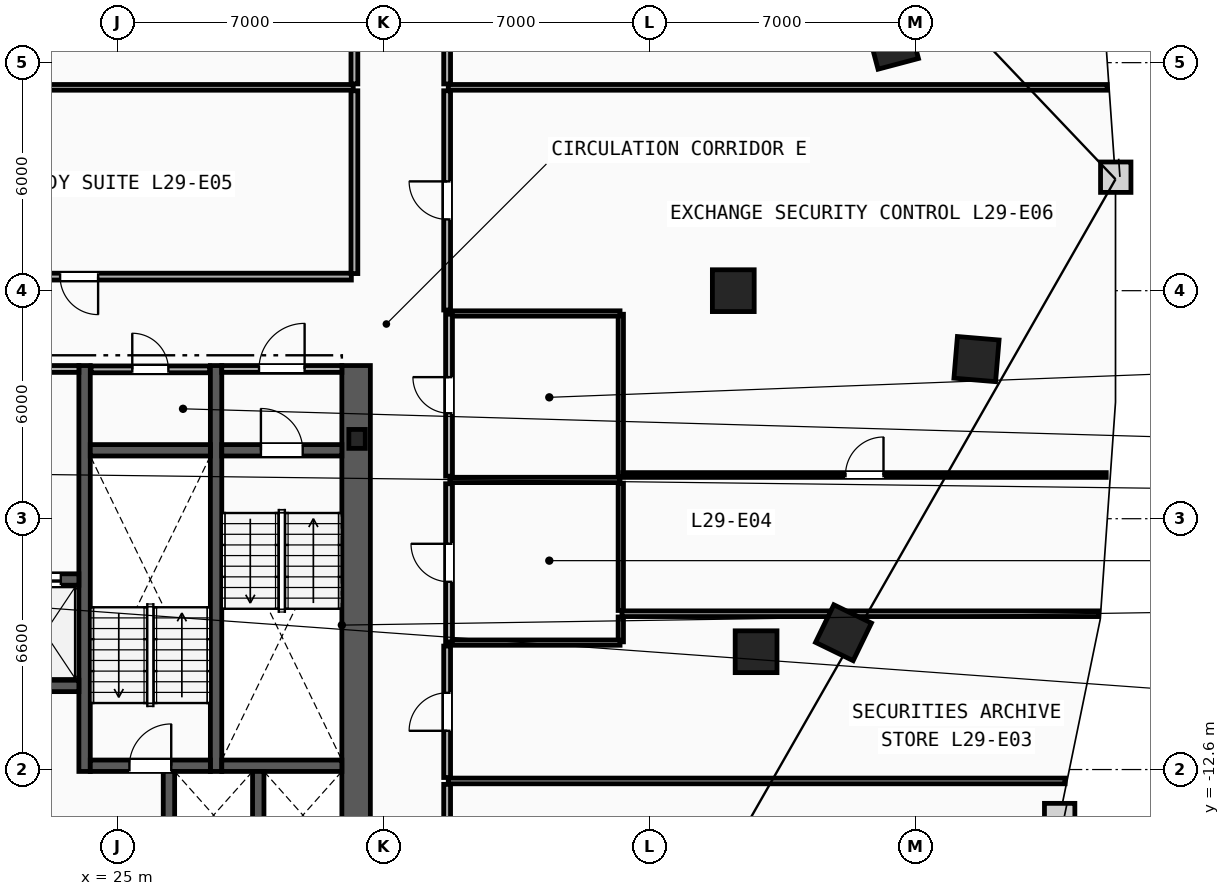
"""IFC4 building model, lengths in metres.
Left out: names, types, materials, properties, quantities, classifications, styles, units other than length and angle.
Written with IfcOpenShell. Run it as: python <this file> out.ifc"""

import sys

from ifc_helpers import new_model, si_unit, direction, frame, frame_2d, origin, origin_2d, place, context, subcontext, project, spatial, rectangle, i_section, extrude, element, fill, save


model = new_model("IFC4")
c1 = context("Model", 3, precision=1e-05, world=origin(), true_north=direction((0.0, 1.0)))
c2 = subcontext(c1, "Body", "Model", "MODEL_VIEW")
j1 = project(units=[si_unit("LENGTHUNIT", "METRE"), si_unit("PLANEANGLEUNIT", "RADIAN")], contexts=[c1])
p1 = place(None, origin())
s1 = spatial("IfcSite", under=j1, at=p1, CompositionType="ELEMENT")
p2 = place(p1, origin())
s2 = spatial("IfcBuilding", under=s1, at=p2, CompositionType="ELEMENT")
p3 = place(p2, frame((0.0, 0.0, 114.2)))
s3 = spatial("IfcBuildingStorey", under=s2, at=p3, CompositionType="ELEMENT", Elevation=114.2)
p4 = place(p3, frame((31.3, -3.9, 0.0), z_axis=(0.0, 0.0, 1.0), x_axis=(1.0, 0.0, 0.0)))
e1 = element("IfcColumn", 1, at=p4, inside=s3, PredefinedType="COLUMN", context=c2, shape_type="SweptSolid", body=[
    extrude(i_section(OverallWidth=0.432, OverallDepth=0.498, WebThickness=0.056, FlangeThickness=0.089, FilletRadius=0.018, at=origin_2d()), origin(), (0.0, 0.0, 1.0), 3.6),
])
for number, where, z_axis, x_axis in (
    (2, (41.2, 0.0, 0.0), (0.0, 0.0, 1.0), (1.0, 0.0, 0.0)),
    (3, (41.8, -9.5, 0.0), (0.0, 0.0, 1.0), (1.0, 0.0, 0.0)),
    (4, (44.1, -9.0, 0.0), (0.0, 0.0, 1.0), (0.437, 0.899, 0.0)),
    (5, (47.6, -1.8, 0.0), (0.0, 0.0, 1.0), (0.084, 0.997, 0.0)),
    (6, (45.4, 6.5, 0.0), (0.0, 0.0, 1.0), (-0.256, 0.967, 0.0)),
):
    element("IfcColumn", number, at=place(p3, frame(where, z_axis=z_axis, x_axis=x_axis)), inside=s3, PredefinedType="COLUMN", context=c2, shape_type="SweptSolid", body=[
        extrude(rectangle(XDim=1.1, YDim=1.1, at=origin_2d()), origin(), (0.0, 0.0, 1.0), 3.6),
    ])
p5 = place(p3, frame((31.275, -15.3, 0.0), z_axis=(0.0, 0.0, 1.0), x_axis=(0.0, 1.0, 0.0)))
e7 = element("IfcWall", 7, at=p5, inside=s3, PredefinedType="SHEAR", context=c2, shape_type="SweptSolid", body=[
    extrude(rectangle(XDim=13.33, YDim=0.75, at=frame_2d((6.665, 0.0))), origin(), (0.0, 0.0, 1.0), 3.3),
])
for number, where, z_axis, x_axis in (
    (8, (27.59, -12.65, 0.0), (0.0, 0.0, 1.0), (0.0, 1.0, 0.0)),
    (9, (24.13, -12.65, 0.0), (0.0, 0.0, 1.0), (0.0, 1.0, 0.0)),
):
    element("IfcWall", number, at=place(p3, frame(where, z_axis=z_axis, x_axis=x_axis)), inside=s3, PredefinedType="SHEAR", context=c2, shape_type="SweptSolid", body=[
        extrude(rectangle(XDim=10.68, YDim=0.3, at=frame_2d((5.34, 0.0))), origin(), (0.0, 0.0, 1.0), 3.3),
    ])
p6 = place(p3, frame((27.74, -4.2, 0.0), z_axis=(0.0, 0.0, 1.0), x_axis=(1.0, 0.0, 0.0)))
e10 = element("IfcWall", 10, at=p6, inside=s3, PredefinedType="SHEAR", context=c2, shape_type="SweptSolid", body=[
    extrude(rectangle(XDim=3.16, YDim=0.3, at=frame_2d((1.58, 0.0))), origin(), (0.0, 0.0, 1.0), 3.3),
])
p7 = place(p6, frame((1.03, 0.0, 0.0)))
e11 = element("IfcOpeningElement", 11, at=p7, cuts=e10, PredefinedType="OPENING", context=c2, shape_type="SweptSolid", body=[
    extrude(rectangle(XDim=1.1, YDim=2.15, at=frame_2d((0.55, 1.075))), frame((0.0, 0.16, 0.0), z_axis=(0.0, -1.0, 0.0), x_axis=(1.0, 0.0, 0.0)), (0.0, 0.0, 1.0), 0.32),
])
p8 = place(p3, frame((27.74, -12.5, 0.0), z_axis=(0.0, 0.0, 1.0), x_axis=(1.0, 0.0, 0.0)))
e12 = element("IfcWall", 12, at=p8, inside=s3, PredefinedType="SHEAR", context=c2, shape_type="SweptSolid", body=[
    extrude(rectangle(XDim=3.16, YDim=0.3, at=frame_2d((1.58, 0.0))), origin(), (0.0, 0.0, 1.0), 3.3),
])
p9 = place(p3, frame((24.28, -12.5, 0.0), z_axis=(0.0, 0.0, 1.0), x_axis=(1.0, 0.0, 0.0)))
e13 = element("IfcWall", 13, at=p9, inside=s3, PredefinedType="SHEAR", context=c2, shape_type="SweptSolid", body=[
    extrude(rectangle(XDim=3.16, YDim=0.3, at=frame_2d((1.58, 0.0))), origin(), (0.0, 0.0, 1.0), 3.3),
])
p10 = place(p9, frame((1.03, 0.0, 0.0)))
e14 = element("IfcOpeningElement", 14, at=p10, cuts=e13, PredefinedType="OPENING", context=c2, shape_type="SweptSolid", body=[
    extrude(rectangle(XDim=1.1, YDim=2.15, at=frame_2d((0.55, 1.075))), frame((0.0, 0.16, 0.0), z_axis=(0.0, -1.0, 0.0), x_axis=(1.0, 0.0, 0.0)), (0.0, 0.0, 1.0), 0.32),
])
p11 = place(p3, frame((24.28, -4.2, 0.0), z_axis=(0.0, 0.0, 1.0), x_axis=(1.0, 0.0, 0.0)))
e15 = element("IfcWall", 15, at=p11, inside=s3, PredefinedType="SHEAR", context=c2, shape_type="SweptSolid", body=[
    extrude(rectangle(XDim=3.16, YDim=0.3, at=frame_2d((1.58, 0.0))), origin(), (0.0, 0.0, 1.0), 3.3),
])
p12 = place(p3, frame((20.98, -2.06, 0.0), z_axis=(0.0, 0.0, 1.0), x_axis=(1.0, 0.0, 0.0)))
e16 = element("IfcWall", 16, at=p12, inside=s3, PredefinedType="PARTITIONING", context=c2, shape_type="SweptSolid", body=[
    extrude(rectangle(XDim=3.0, YDim=0.18, at=frame_2d((1.5, 0.0))), origin(), (0.0, 0.0, 1.0), 3.3),
])
p13 = place(p12, frame((0.9, 0.0, 0.0)))
e17 = element("IfcOpeningElement", 17, at=p13, cuts=e16, PredefinedType="OPENING", context=c2, shape_type="SweptSolid", body=[
    extrude(rectangle(XDim=1.2, YDim=2.15, at=frame_2d((0.6, 1.075))), frame((0.0, 0.1, 0.0), z_axis=(0.0, -1.0, 0.0), x_axis=(1.0, 0.0, 0.0)), (0.0, 0.0, 1.0), 0.2),
])
p14 = place(p3, frame((27.74, -2.06, 0.0), z_axis=(0.0, 0.0, 1.0), x_axis=(1.0, 0.0, 0.0)))
e18 = element("IfcWall", 18, at=p14, inside=s3, PredefinedType="PARTITIONING", context=c2, shape_type="SweptSolid", body=[
    extrude(rectangle(XDim=3.16, YDim=0.18, at=frame_2d((1.58, 0.0))), origin(), (0.0, 0.0, 1.0), 3.3),
])
p15 = place(p14, frame((0.98, 0.0, 0.0)))
e19 = element("IfcOpeningElement", 19, at=p15, cuts=e18, PredefinedType="OPENING", context=c2, shape_type="SweptSolid", body=[
    extrude(rectangle(XDim=1.2, YDim=2.15, at=frame_2d((0.6, 1.075))), frame((0.0, 0.1, 0.0), z_axis=(0.0, -1.0, 0.0), x_axis=(1.0, 0.0, 0.0)), (0.0, 0.0, 1.0), 0.2),
])
p16 = place(p3, frame((21.88, -7.6, 0.0), z_axis=(0.0, 0.0, 1.0), x_axis=(1.0, 0.0, 0.0)))
e20 = element("IfcWall", 20, at=p16, inside=s3, PredefinedType="SHEAR", context=c2, shape_type="SweptSolid", body=[
    extrude(rectangle(XDim=2.1, YDim=0.3, at=frame_2d((1.05, 0.0))), origin(), (0.0, 0.0, 1.0), 3.3),
])
p17 = place(p16, frame((0.475, 0.0, 0.0)))
e21 = element("IfcOpeningElement", 21, at=p17, cuts=e20, PredefinedType="OPENING", context=c2, shape_type="SweptSolid", body=[
    extrude(rectangle(XDim=1.15, YDim=2.2, at=frame_2d((0.575, 1.1))), frame((0.0, 0.16, 0.0), z_axis=(0.0, -1.0, 0.0), x_axis=(1.0, 0.0, 0.0)), (0.0, 0.0, 1.0), 0.32),
])
p18 = place(p3, frame((21.88, -10.4, 0.0), z_axis=(0.0, 0.0, 1.0), x_axis=(1.0, 0.0, 0.0)))
e22 = element("IfcWall", 22, at=p18, inside=s3, PredefinedType="SHEAR", context=c2, shape_type="SweptSolid", body=[
    extrude(rectangle(XDim=2.1, YDim=0.3, at=frame_2d((1.05, 0.0))), origin(), (0.0, 0.0, 1.0), 3.3),
])
for number, where, z_axis, x_axis in (
    (23, (28.7, -14.95, 0.0), (0.0, 0.0, 1.0), (0.0, 1.0, 0.0)),
    (24, (26.35, -14.95, 0.0), (0.0, 0.0, 1.0), (0.0, 1.0, 0.0)),
):
    element("IfcWall", number, at=place(p3, frame(where, z_axis=z_axis, x_axis=x_axis)), inside=s3, PredefinedType="SHEAR", context=c2, shape_type="SweptSolid", body=[
        extrude(rectangle(XDim=2.3, YDim=0.3, at=frame_2d((1.15, 0.0))), origin(), (0.0, 0.0, 1.0), 3.3),
    ])
p19 = place(p3, frame((24.3, -2.07, 0.0), z_axis=(0.0, 0.0, 1.0), x_axis=(1.0, 0.0, 0.0)))
e25 = element("IfcWall", 25, at=p19, inside=s3, PredefinedType="PARTITIONING", context=c2, shape_type="SweptSolid", body=[
    extrude(rectangle(XDim=3.12, YDim=0.18, at=frame_2d((1.56, 0.0))), origin(), (0.0, 0.0, 1.0), 3.3),
])
p20 = place(p19, frame((1.085, 0.0, 0.0)))
e26 = element("IfcOpeningElement", 26, at=p20, cuts=e25, PredefinedType="OPENING", context=c2, shape_type="SweptSolid", body=[
    extrude(rectangle(XDim=0.95, YDim=2.1, at=frame_2d((0.475, 1.05))), frame((0.0, 0.1, 0.0), z_axis=(0.0, -1.0, 0.0), x_axis=(1.0, 0.0, 0.0)), (0.0, 0.0, 1.0), 0.2),
])
p21 = place(p3, frame((38.24, -9.24, 0.0), z_axis=(0.0, 0.0, 1.0), x_axis=(0.0, 1.0, 0.0)))
e27 = element("IfcWall", 27, at=p21, inside=s3, PredefinedType="PARTITIONING", context=c2, shape_type="SweptSolid", body=[
    extrude(rectangle(XDim=0.655, YDim=0.14, at=frame_2d((0.328, 0.0))), origin(), (0.0, 0.0, 1.0), 3.3),
])
p22 = place(p3, frame((38.24, -8.415, 0.0), z_axis=(0.0, 0.0, 1.0), x_axis=(0.0, 1.0, 0.0)))
e28 = element("IfcWall", 28, at=p22, inside=s3, PredefinedType="PARTITIONING", context=c2, shape_type="SweptSolid", body=[
    extrude(rectangle(XDim=3.35, YDim=0.14, at=frame_2d((1.675, 0.0))), origin(), (0.0, 0.0, 1.0), 3.3),
])
p23 = place(p3, frame((38.24, -4.895, 0.0), z_axis=(0.0, 0.0, 1.0), x_axis=(0.0, 1.0, 0.0)))
e29 = element("IfcWall", 29, at=p23, inside=s3, PredefinedType="PARTITIONING", context=c2, shape_type="SweptSolid", body=[
    extrude(rectangle(XDim=4.275, YDim=0.14, at=frame_2d((2.137, 0.0))), origin(), (0.0, 0.0, 1.0), 3.3),
])
for number, where, z_axis, x_axis in (
    (30, (33.74, -0.6, 0.0), (0.0, 0.0, 1.0), (1.0, 0.0, 0.0)),
    (31, (33.74, -4.98, 0.0), (0.0, 0.0, 1.0), (1.0, 0.0, 0.0)),
    (32, (33.74, -9.26, 0.0), (0.0, 0.0, 1.0), (1.0, 0.0, 0.0)),
):
    element("IfcWall", number, at=place(p3, frame(where, z_axis=z_axis, x_axis=x_axis)), inside=s3, PredefinedType="PARTITIONING", context=c2, shape_type="SweptSolid", body=[
        extrude(rectangle(XDim=4.48, YDim=0.14, at=frame_2d((2.24, 0.0))), origin(), (0.0, 0.0, 1.0), 3.3),
    ])
p24 = place(p3, frame((33.72, -4.88, 0.0), z_axis=(0.0, 0.0, 1.0), x_axis=(0.0, 1.0, 0.0)))
e33 = element("IfcWall", 33, at=p24, inside=s3, PredefinedType="PARTITIONING", context=c2, shape_type="SweptSolid", body=[
    extrude(rectangle(XDim=4.26, YDim=0.18, at=frame_2d((2.13, 0.0))), origin(), (0.0, 0.0, 1.0), 3.3),
])
p25 = place(p24, frame((1.655, 0.0, 0.0)))
e34 = element("IfcOpeningElement", 34, at=p25, cuts=e33, PredefinedType="OPENING", context=c2, shape_type="SweptSolid", body=[
    extrude(rectangle(XDim=0.95, YDim=2.1, at=frame_2d((0.475, 1.05))), frame((0.0, 0.1, 0.0), z_axis=(0.0, -1.0, 0.0), x_axis=(1.0, 0.0, 0.0)), (0.0, 0.0, 1.0), 0.2),
])
p26 = place(p3, frame((33.72, -9.24, 0.0), z_axis=(0.0, 0.0, 1.0), x_axis=(0.0, 1.0, 0.0)))
e35 = element("IfcWall", 35, at=p26, inside=s3, PredefinedType="PARTITIONING", context=c2, shape_type="SweptSolid", body=[
    extrude(rectangle(XDim=4.16, YDim=0.18, at=frame_2d((2.08, 0.0))), origin(), (0.0, 0.0, 1.0), 3.3),
])
p27 = place(p26, frame((1.58, 0.0, 0.0)))
e36 = element("IfcOpeningElement", 36, at=p27, cuts=e35, PredefinedType="OPENING", context=c2, shape_type="SweptSolid", body=[
    extrude(rectangle(XDim=1.0, YDim=2.15, at=frame_2d((0.5, 1.075))), frame((0.0, 0.1, 0.0), z_axis=(0.0, -1.0, 0.0), x_axis=(1.0, 0.0, 0.0)), (0.0, 0.0, 1.0), 0.2),
])
p28 = place(p3, frame((12.962, 5.35, 0.0), z_axis=(0.0, 0.0, 1.0), x_axis=(1.0, 0.0, 0.0)))
e37 = element("IfcWall", 37, at=p28, inside=s3, PredefinedType="PARTITIONING", context=c2, shape_type="SweptSolid", body=[
    extrude(rectangle(XDim=18.238, YDim=0.15, at=frame_2d((9.119, 0.0))), origin(), (0.0, 0.0, 1.0), 3.3),
])
p29 = place(p3, frame((33.7, 5.35, 0.0), z_axis=(0.0, 0.0, 1.0), x_axis=(1.0, 0.0, 0.0)))
e38 = element("IfcWall", 38, at=p29, inside=s3, PredefinedType="PARTITIONING", context=c2, shape_type="SweptSolid", body=[
    extrude(rectangle(XDim=17.338, YDim=0.15, at=frame_2d((8.669, 0.0))), origin(), (0.0, 0.0, 1.0), 3.3),
])
p30 = place(p3, frame((38.27, -8.5, 0.0), z_axis=(0.0, 0.0, 1.0), x_axis=(1.0, 0.0, 0.0)))
e39 = element("IfcWall", 39, at=p30, inside=s3, PredefinedType="PARTITIONING", context=c2, shape_type="SweptSolid", body=[
    extrude(rectangle(XDim=12.546, YDim=0.15, at=frame_2d((6.273, 0.0))), origin(), (0.0, 0.0, 1.0), 3.3),
])
p31 = place(p3, frame((33.7, -12.9, 0.0), z_axis=(0.0, 0.0, 1.0), x_axis=(1.0, 0.0, 0.0)))
e40 = element("IfcWall", 40, at=p31, inside=s3, PredefinedType="PARTITIONING", context=c2, shape_type="SweptSolid", body=[
    extrude(rectangle(XDim=16.231, YDim=0.15, at=frame_2d((8.115, 0.0))), origin(), (0.0, 0.0, 1.0), 3.3),
])
p32 = place(p3, frame((33.67, -17.428, 0.0), z_axis=(0.0, 0.0, 1.0), x_axis=(0.0, 1.0, 0.0)))
e41 = element("IfcWall", 41, at=p32, inside=s3, PredefinedType="PARTITIONING", context=c2, shape_type="SweptSolid", body=[
    extrude(rectangle(XDim=4.438, YDim=0.18, at=frame_2d((2.219, 0.0))), origin(), (0.0, 0.0, 1.0), 3.3),
])
p33 = place(p32, frame((1.719, 0.0, 0.0)))
e42 = element("IfcOpeningElement", 42, at=p33, cuts=e41, PredefinedType="OPENING", context=c2, shape_type="SweptSolid", body=[
    extrude(rectangle(XDim=1.0, YDim=2.15, at=frame_2d((0.5, 1.075))), frame((0.0, 0.1, 0.0), z_axis=(0.0, -1.0, 0.0), x_axis=(1.0, 0.0, 0.0)), (0.0, 0.0, 1.0), 0.2),
])
p34 = place(p3, frame((33.67, -12.81, 0.0), z_axis=(0.0, 0.0, 1.0), x_axis=(0.0, 1.0, 0.0)))
e43 = element("IfcWall", 43, at=p34, inside=s3, PredefinedType="PARTITIONING", context=c2, shape_type="SweptSolid", body=[
    extrude(rectangle(XDim=3.459, YDim=0.18, at=frame_2d((1.729, 0.0))), origin(), (0.0, 0.0, 1.0), 3.3),
])
p35 = place(p34, frame((1.229, 0.0, 0.0)))
e44 = element("IfcOpeningElement", 44, at=p35, cuts=e43, PredefinedType="OPENING", context=c2, shape_type="SweptSolid", body=[
    extrude(rectangle(XDim=1.0, YDim=2.15, at=frame_2d((0.5, 1.075))), frame((0.0, 0.1, 0.0), z_axis=(0.0, -1.0, 0.0), x_axis=(1.0, 0.0, 0.0)), (0.0, 0.0, 1.0), 0.2),
])
p36 = place(p3, frame((31.15, 0.37, 0.0), z_axis=(0.0, 0.0, 1.0), x_axis=(-1.0, 0.0, 0.0)))
e45 = element("IfcWall", 45, at=p36, inside=s3, PredefinedType="PARTITIONING", context=c2, shape_type="SweptSolid", body=[
    extrude(rectangle(XDim=14.328, YDim=0.18, at=frame_2d((7.164, 0.0))), origin(), (0.0, 0.0, 1.0), 3.3),
])
p37 = place(p36, frame((6.664, 0.0, 0.0)))
e46 = element("IfcOpeningElement", 46, at=p37, cuts=e45, PredefinedType="OPENING", context=c2, shape_type="SweptSolid", body=[
    extrude(rectangle(XDim=1.0, YDim=2.15, at=frame_2d((0.5, 1.075))), frame((0.0, 0.1, 0.0), z_axis=(0.0, -1.0, 0.0), x_axis=(1.0, 0.0, 0.0)), (0.0, 0.0, 1.0), 0.2),
])
p38 = place(p3, frame((31.23, 5.26, 0.0), z_axis=(0.0, 0.0, 1.0), x_axis=(0.0, -1.0, 0.0)))
e47 = element("IfcWall", 47, at=p38, inside=s3, PredefinedType="PARTITIONING", context=c2, shape_type="SweptSolid", body=[
    extrude(rectangle(XDim=4.81, YDim=0.18, at=frame_2d((2.405, 0.0))), origin(), (0.0, 0.0, 1.0), 3.3),
])
p39 = place(p3, frame((33.67, -0.509, 0.0), z_axis=(0.0, 0.0, 1.0), x_axis=(0.0, 1.0, 0.0)))
e48 = element("IfcWall", 48, at=p39, inside=s3, PredefinedType="PARTITIONING", context=c2, shape_type="SweptSolid", body=[
    extrude(rectangle(XDim=5.769, YDim=0.18, at=frame_2d((2.884, 0.0))), origin(), (0.0, 0.0, 1.0), 3.3),
])
p40 = place(p39, frame((2.384, 0.0, 0.0)))
e49 = element("IfcOpeningElement", 49, at=p40, cuts=e48, PredefinedType="OPENING", context=c2, shape_type="SweptSolid", body=[
    extrude(rectangle(XDim=1.0, YDim=2.15, at=frame_2d((0.5, 1.075))), frame((0.0, 0.1, 0.0), z_axis=(0.0, -1.0, 0.0), x_axis=(1.0, 0.0, 0.0)), (0.0, 0.0, 1.0), 0.2),
])
for number, where, z_axis, x_axis in (
    (50, (33.67, 5.44, 0.0), (0.0, 0.0, 1.0), (0.0, 1.0, 0.0)),
    (51, (31.23, 11.4, 0.0), (0.0, 0.0, 1.0), (0.0, -1.0, 0.0)),
):
    element("IfcWall", number, at=place(p3, frame(where, z_axis=z_axis, x_axis=x_axis)), inside=s3, PredefinedType="PARTITIONING", context=c2, shape_type="SweptSolid", body=[
        extrude(rectangle(XDim=5.96, YDim=0.18, at=frame_2d((2.98, 0.0))), origin(), (0.0, 0.0, 1.0), 3.3),
    ])
p41 = place(p3, frame((38.292, -4.85, 0.0), z_axis=(0.0, 0.0, 1.0), x_axis=(1.0, 0.0, 0.0)))
e52 = element("IfcWall", 52, at=p41, inside=s3, PredefinedType="PARTITIONING", context=c2, shape_type="SweptSolid", body=[
    extrude(rectangle(XDim=12.723, YDim=0.125, at=frame_2d((6.361, 0.0))), origin(), (0.0, 0.0, 1.0), 3.3),
])
p42 = place(p41, frame((5.861, 0.0, 0.0)))
e53 = element("IfcOpeningElement", 53, at=p42, cuts=e52, PredefinedType="OPENING", context=c2, shape_type="SweptSolid", body=[
    extrude(rectangle(XDim=1.0, YDim=2.15, at=frame_2d((0.5, 1.075))), frame((0.0, 0.073, 0.0), z_axis=(0.0, -1.0, 0.0), x_axis=(1.0, 0.0, 0.0)), (0.0, 0.0, 1.0), 0.145),
])
p43 = place(p7, origin())
e54 = element("IfcDoor", 54, at=p43, inside=s3, OperationType="SINGLE_SWING_LEFT", PredefinedType="DOOR", context=c2, shape_type="SweptSolid", body=[
    extrude(rectangle(XDim=1.1, YDim=2.15, at=frame_2d((0.55, 1.075))), frame((0.0, 0.025, 0.0), z_axis=(0.0, -1.0, 0.0), x_axis=(1.0, 0.0, 0.0)), (0.0, 0.0, 1.0), 0.05),
])
fill(e11, e54)
p44 = place(p10, origin())
e55 = element("IfcDoor", 55, at=p44, inside=s3, OperationType="SINGLE_SWING_RIGHT", PredefinedType="DOOR", context=c2, shape_type="SweptSolid", body=[
    extrude(rectangle(XDim=1.1, YDim=2.15, at=frame_2d((0.55, 1.075))), frame((0.0, 0.025, 0.0), z_axis=(0.0, -1.0, 0.0), x_axis=(1.0, 0.0, 0.0)), (0.0, 0.0, 1.0), 0.05),
])
fill(e14, e55)
p45 = place(p15, origin())
e56 = element("IfcDoor", 56, at=p45, inside=s3, OperationType="SINGLE_SWING_RIGHT", PredefinedType="DOOR", context=c2, shape_type="SweptSolid", body=[
    extrude(rectangle(XDim=1.2, YDim=2.15, at=frame_2d((0.6, 1.075))), frame((0.0, 0.025, 0.0), z_axis=(0.0, -1.0, 0.0), x_axis=(1.0, 0.0, 0.0)), (0.0, 0.0, 1.0), 0.05),
])
fill(e19, e56)
p46 = place(p17, origin())
e57 = element("IfcDoor", 57, at=p46, inside=s3, OperationType="SLIDING_TO_LEFT", PredefinedType="TRAPDOOR", context=c2, shape_type="SweptSolid", body=[
    extrude(rectangle(XDim=1.15, YDim=2.2, at=frame_2d((0.575, 1.1))), frame((0.0, 0.025, 0.0), z_axis=(0.0, -1.0, 0.0), x_axis=(1.0, 0.0, 0.0)), (0.0, 0.0, 1.0), 0.05),
])
fill(e21, e57)
p47 = place(p37, origin())
e58 = element("IfcDoor", 58, at=p47, inside=s3, OperationType="SINGLE_SWING_LEFT", PredefinedType="DOOR", context=c2, shape_type="SweptSolid", body=[
    extrude(rectangle(XDim=1.0, YDim=2.15, at=frame_2d((0.5, 1.075))), frame((0.0, 0.025, 0.0), z_axis=(0.0, -1.0, 0.0), x_axis=(1.0, 0.0, 0.0)), (0.0, 0.0, 1.0), 0.05),
])
fill(e46, e58)
p48 = place(p42, origin())
e59 = element("IfcDoor", 59, at=p48, inside=s3, OperationType="SINGLE_SWING_RIGHT", PredefinedType="DOOR", context=c2, shape_type="SweptSolid", body=[
    extrude(rectangle(XDim=1.0, YDim=2.15, at=frame_2d((0.5, 1.075))), frame((0.0, 0.025, 0.0), z_axis=(0.0, -1.0, 0.0), x_axis=(1.0, 0.0, 0.0)), (0.0, 0.0, 1.0), 0.05),
])
fill(e53, e59)
p49 = place(p40, origin())
e60 = element("IfcDoor", 60, at=p49, inside=s3, OperationType="SINGLE_SWING_RIGHT", PredefinedType="DOOR", context=c2, shape_type="SweptSolid", body=[
    extrude(rectangle(XDim=1.0, YDim=2.15, at=frame_2d((0.5, 1.075))), frame((0.0, 0.025, 0.0), z_axis=(0.0, -1.0, 0.0), x_axis=(1.0, 0.0, 0.0)), (0.0, 0.0, 1.0), 0.05),
])
fill(e49, e60)
p50 = place(p25, origin())
e61 = element("IfcDoor", 61, at=p50, inside=s3, OperationType="SINGLE_SWING_RIGHT", PredefinedType="DOOR", context=c2, shape_type="SweptSolid", body=[
    extrude(rectangle(XDim=0.95, YDim=2.1, at=frame_2d((0.475, 1.05))), frame((0.0, 0.025, 0.0), z_axis=(0.0, -1.0, 0.0), x_axis=(1.0, 0.0, 0.0)), (0.0, 0.0, 1.0), 0.05),
])
fill(e34, e61)
p51 = place(p27, origin())
e62 = element("IfcDoor", 62, at=p51, inside=s3, OperationType="SINGLE_SWING_RIGHT", PredefinedType="DOOR", context=c2, shape_type="SweptSolid", body=[
    extrude(rectangle(XDim=1.0, YDim=2.15, at=frame_2d((0.5, 1.075))), frame((0.0, 0.025, 0.0), z_axis=(0.0, -1.0, 0.0), x_axis=(1.0, 0.0, 0.0)), (0.0, 0.0, 1.0), 0.05),
])
fill(e36, e62)
p52 = place(p35, origin())
e63 = element("IfcDoor", 63, at=p52, inside=s3, OperationType="SINGLE_SWING_LEFT", PredefinedType="DOOR", context=c2, shape_type="SweptSolid", body=[
    extrude(rectangle(XDim=1.0, YDim=2.15, at=frame_2d((0.5, 1.075))), frame((0.0, 0.025, 0.0), z_axis=(0.0, -1.0, 0.0), x_axis=(1.0, 0.0, 0.0)), (0.0, 0.0, 1.0), 0.05),
])
fill(e44, e63)
p53 = place(p20, origin())
e64 = element("IfcDoor", 64, at=p53, inside=s3, OperationType="SINGLE_SWING_LEFT", PredefinedType="DOOR", context=c2, shape_type="SweptSolid", body=[
    extrude(rectangle(XDim=0.95, YDim=2.1, at=frame_2d((0.475, 1.05))), frame((0.0, 0.025, 0.0), z_axis=(0.0, -1.0, 0.0), x_axis=(1.0, 0.0, 0.0)), (0.0, 0.0, 1.0), 0.05),
])
fill(e26, e64)
save(model, sys.argv[1])
